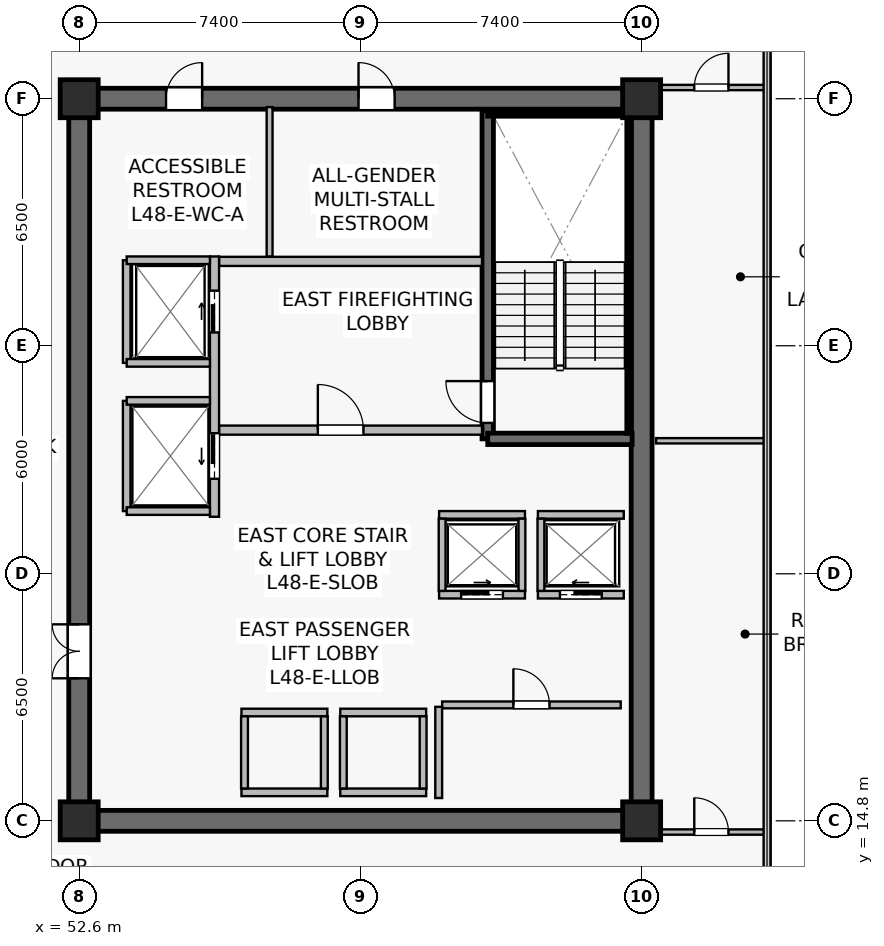
"""IFC4 building model, lengths in metres.
Left out: names, types, materials, properties, quantities, classifications, styles, units other than length and angle.
Written with IfcOpenShell. Run it as: python <this file> out.ifc"""

import sys

from ifc_helpers import new_model, si_unit, direction, frame, frame_2d, origin, origin_2d, place, context, subcontext, project, spatial, rectangle, extrude, source, transform, mapped, element, fill, save


model = new_model("IFC4")
c1 = context("Model", 3, precision=1e-05, world=origin(), true_north=direction((0.0, 1.0)))
c2 = subcontext(c1, "Body", "Model", "MODEL_VIEW")
j1 = project(units=[si_unit("LENGTHUNIT", "METRE"), si_unit("PLANEANGLEUNIT", "RADIAN")], contexts=[c1])
p1 = place(None, origin())
s1 = spatial("IfcSite", under=j1, at=p1, CompositionType="ELEMENT")
p2 = place(p1, origin())
s2 = spatial("IfcBuilding", under=s1, at=p2, CompositionType="ELEMENT")
p3 = place(p2, frame((0.0, 0.0, 201.4)))
s3 = spatial("IfcBuildingStorey", under=s2, at=p3, CompositionType="ELEMENT", Elevation=201.4)
p4 = place(p3, frame((52.325, 14.8, 0.0), z_axis=(0.0, 0.0, 1.0), x_axis=(1.0, 0.0, 0.0)))
e1 = element("IfcWall", 1, at=p4, inside=s3, PredefinedType="SHEAR", context=c2, shape_type="SweptSolid", body=[
    extrude(rectangle(XDim=15.35, YDim=0.55, at=frame_2d((7.675, 0.0))), origin(), (0.0, 0.0, 1.0), 3.8),
])
p5 = place(p3, frame((52.325, 33.8, 0.0), z_axis=(0.0, 0.0, 1.0), x_axis=(1.0, 0.0, 0.0)))
e2 = element("IfcWall", 2, at=p5, inside=s3, PredefinedType="SHEAR", context=c2, shape_type="SweptSolid", body=[
    extrude(rectangle(XDim=15.35, YDim=0.55, at=frame_2d((7.675, 0.0))), origin(), (0.0, 0.0, 1.0), 3.8),
])
p6 = place(p5, frame((7.625, 0.0, 0.0)))
e3 = element("IfcOpeningElement", 3, at=p6, cuts=e2, PredefinedType="OPENING", context=c2, shape_type="SweptSolid", body=[
    extrude(rectangle(XDim=0.95, YDim=2.15, at=frame_2d((0.475, 1.075))), frame((0.0, 0.285, 0.0), z_axis=(0.0, -1.0, 0.0), x_axis=(1.0, 0.0, 0.0)), (0.0, 0.0, 1.0), 0.57),
])
p7 = place(p5, frame((2.56, 0.0, 0.0)))
e4 = element("IfcOpeningElement", 4, at=p7, cuts=e2, PredefinedType="OPENING", context=c2, shape_type="SweptSolid", body=[
    extrude(rectangle(XDim=0.95, YDim=2.15, at=frame_2d((0.475, 1.075))), frame((0.0, 0.285, 0.0), z_axis=(0.0, -1.0, 0.0), x_axis=(1.0, 0.0, 0.0)), (0.0, 0.0, 1.0), 0.57),
])
p8 = place(p3, frame((52.6, 15.075, 0.0), z_axis=(0.0, 0.0, 1.0), x_axis=(0.0, 1.0, 0.0)))
e5 = element("IfcWall", 5, at=p8, inside=s3, PredefinedType="SHEAR", context=c2, shape_type="SweptSolid", body=[
    extrude(rectangle(XDim=18.45, YDim=0.55, at=frame_2d((9.225, 0.0))), origin(), (0.0, 0.0, 1.0), 3.8),
])
p9 = place(p8, frame((3.475, 0.0, 0.0)))
e6 = element("IfcOpeningElement", 6, at=p9, cuts=e5, PredefinedType="OPENING", context=c2, shape_type="SweptSolid", body=[
    extrude(rectangle(XDim=1.42, YDim=2.2, at=frame_2d((0.71, 1.1))), frame((0.0, 0.285, 0.0), z_axis=(0.0, -1.0, 0.0), x_axis=(1.0, 0.0, 0.0)), (0.0, 0.0, 1.0), 0.57),
])
p10 = place(p3, frame((67.4, 15.075, 0.0), z_axis=(0.0, 0.0, 1.0), x_axis=(0.0, 1.0, 0.0)))
e7 = element("IfcWall", 7, at=p10, inside=s3, PredefinedType="SHEAR", context=c2, shape_type="SweptSolid", body=[
    extrude(rectangle(XDim=18.45, YDim=0.55, at=frame_2d((9.225, 0.0))), origin(), (0.0, 0.0, 1.0), 3.8),
])
p11 = place(p3, frame((63.35, 24.85, 0.0), z_axis=(0.0, 0.0, 1.0), x_axis=(0.0, 1.0, 0.0)))
e8 = element("IfcWall", 8, at=p11, inside=s3, PredefinedType="SHEAR", context=c2, shape_type="SweptSolid", body=[
    extrude(rectangle(XDim=8.63, YDim=0.3, at=frame_2d((4.315, 0.0))), origin(), (0.0, 0.0, 1.0), 3.8),
])
p12 = place(p11, frame((0.42, 0.0, 0.0)))
e9 = element("IfcOpeningElement", 9, at=p12, cuts=e8, PredefinedType="OPENING", context=c2, shape_type="SweptSolid", body=[
    extrude(rectangle(XDim=1.1, YDim=2.15, at=frame_2d((0.55, 1.075))), frame((0.0, 0.16, 0.0), z_axis=(0.0, -1.0, 0.0), x_axis=(1.0, 0.0, 0.0)), (0.0, 0.0, 1.0), 0.32),
])
p13 = place(p3, frame((63.35, 24.85, 0.0), z_axis=(0.0, 0.0, 1.0), x_axis=(1.0, 0.0, 0.0)))
e10 = element("IfcWall", 10, at=p13, inside=s3, PredefinedType="SHEAR", context=c2, shape_type="SweptSolid", body=[
    extrude(rectangle(XDim=3.8, YDim=0.3, at=frame_2d((1.9, 0.0))), origin(), (0.0, 0.0, 1.0), 3.8),
])
p14 = place(p3, frame((63.35, 33.4, 0.0), z_axis=(0.0, 0.0, 1.0), x_axis=(1.0, 0.0, 0.0)))
e11 = element("IfcWall", 11, at=p14, inside=s3, PredefinedType="SOLIDWALL", context=c2, shape_type="SweptSolid", body=[
    extrude(rectangle(XDim=3.72, YDim=0.12, at=frame_2d((1.86, 0.0))), origin(), (0.0, 0.0, 1.0), 3.8),
])
p15 = place(p3, frame((67.07, 25.0, 0.0), z_axis=(0.0, 0.0, 1.0), x_axis=(0.0, 1.0, 0.0)))
e12 = element("IfcWall", 12, at=p15, inside=s3, PredefinedType="SOLIDWALL", context=c2, shape_type="SweptSolid", body=[
    extrude(rectangle(XDim=8.32, YDim=0.12, at=frame_2d((4.16, 0.0))), origin(), (0.0, 0.0, 1.0), 3.8),
])
m1 = source(origin(), c2, "Body", "SweptSolid", [
    extrude(rectangle(XDim=1.0, YDim=1.0, at=origin_2d()), origin(), (0.0, 0.0, 1.0), 4.1),
])
for number, where, z_axis, x_axis in (
    (13, (52.6, 14.8, 0.0), (0.0, 0.0, 1.0), (1.0, 0.0, 0.0)),
    (14, (67.4, 14.8, 0.0), (0.0, 0.0, 1.0), (1.0, 0.0, 0.0)),
    (15, (52.6, 33.8, 0.0), (0.0, 0.0, 1.0), (1.0, 0.0, 0.0)),
    (16, (67.4, 33.8, 0.0), (0.0, 0.0, 1.0), (1.0, 0.0, 0.0)),
):
    element("IfcColumn", number, at=place(p3, frame(where, z_axis=z_axis, x_axis=x_axis)), inside=s3, PredefinedType="COLUMN", context=c2, shape_type="MappedRepresentation", body=[
        mapped(m1, transform((0.0, 0.0, 0.0), scale=1.0)),
    ])
p16 = place(p3, frame((56.28, 25.08, 0.0), z_axis=(0.0, 0.0, 1.0), x_axis=(1.0, 0.0, 0.0)))
e17 = element("IfcWall", 17, at=p16, inside=s3, PredefinedType="SOLIDWALL", context=c2, shape_type="SweptSolid", body=[
    extrude(rectangle(XDim=6.92, YDim=0.24, at=frame_2d((3.46, 0.0))), origin(), (0.0, 0.0, 1.0), 3.197),
])
p17 = place(p16, frame((2.6, 0.0, 0.0)))
e18 = element("IfcOpeningElement", 18, at=p17, cuts=e17, PredefinedType="OPENING", context=c2, shape_type="SweptSolid", body=[
    extrude(rectangle(XDim=1.2, YDim=2.16, at=frame_2d((0.6, 1.08))), frame((0.0, 0.13, 0.0), z_axis=(0.0, -1.0, 0.0), x_axis=(1.0, 0.0, 0.0)), (0.0, 0.0, 1.0), 0.26),
])
p18 = place(p3, frame((56.28, 29.52, 0.0), z_axis=(0.0, 0.0, 1.0), x_axis=(1.0, 0.0, 0.0)))
e19 = element("IfcWall", 19, at=p18, inside=s3, PredefinedType="SOLIDWALL", context=c2, shape_type="SweptSolid", body=[
    extrude(rectangle(XDim=6.92, YDim=0.24, at=frame_2d((3.46, 0.0))), origin(), (0.0, 0.0, 1.0), 3.197),
])
p19 = place(p3, frame((56.16, 22.8, 0.0), z_axis=(0.0, 0.0, 1.0), x_axis=(0.0, 1.0, 0.0)))
e20 = element("IfcWall", 20, at=p19, inside=s3, PredefinedType="SOLIDWALL", context=c2, shape_type="SweptSolid", body=[
    extrude(rectangle(XDim=6.85, YDim=0.24, at=frame_2d((3.425, 0.0))), origin(), (0.0, 0.0, 1.0), 2.935),
])
p20 = place(p19, frame((4.85, 0.0, 0.0)))
e21 = element("IfcOpeningElement", 21, at=p20, cuts=e20, PredefinedType="OPENING", context=c2, shape_type="SweptSolid", body=[
    extrude(rectangle(XDim=1.1, YDim=2.22, at=frame_2d((0.55, 1.11))), frame((0.0, 0.13, 0.0), z_axis=(0.0, -1.0, 0.0), x_axis=(1.0, 0.0, 0.0)), (0.0, 0.0, 1.0), 0.26),
])
p21 = place(p19, frame((1.0, 0.0, 0.0)))
e22 = element("IfcOpeningElement", 22, at=p21, cuts=e20, PredefinedType="OPENING", context=c2, shape_type="SweptSolid", body=[
    extrude(rectangle(XDim=1.2, YDim=2.22, at=frame_2d((0.6, 1.11))), frame((0.0, 0.13, 0.0), z_axis=(0.0, -1.0, 0.0), x_axis=(1.0, 0.0, 0.0)), (0.0, 0.0, 1.0), 0.26),
])
for number, where, z_axis, x_axis in (
    (23, (59.47, 17.65, 0.0), (0.0, 0.0, 1.0), (1.0, 0.0, 0.0)),
    (24, (59.47, 15.55, 0.0), (0.0, 0.0, 1.0), (1.0, 0.0, 0.0)),
):
    element("IfcWall", number, at=place(p3, frame(where, z_axis=z_axis, x_axis=x_axis)), inside=s3, PredefinedType="SOLIDWALL", context=c2, shape_type="SweptSolid", body=[
        extrude(rectangle(XDim=2.26, YDim=0.2, at=frame_2d((1.13, 0.0))), origin(), (0.0, 0.0, 1.0), 3.197),
    ])
for number, where, z_axis, x_axis in (
    (25, (59.55, 15.65, 0.0), (0.0, 0.0, 1.0), (0.0, 1.0, 0.0)),
    (26, (61.65, 15.65, 0.0), (0.0, 0.0, 1.0), (0.0, 1.0, 0.0)),
):
    element("IfcWall", number, at=place(p3, frame(where, z_axis=z_axis, x_axis=x_axis)), inside=s3, PredefinedType="SOLIDWALL", context=c2, shape_type="SweptSolid", body=[
        extrude(rectangle(XDim=1.9, YDim=0.18, at=frame_2d((0.95, 0.0))), origin(), (0.0, 0.0, 1.0), 3.8),
    ])
for number, where, z_axis, x_axis in (
    (27, (56.87, 17.65, 0.0), (0.0, 0.0, 1.0), (1.0, 0.0, 0.0)),
    (28, (56.87, 15.55, 0.0), (0.0, 0.0, 1.0), (1.0, 0.0, 0.0)),
):
    element("IfcWall", number, at=place(p3, frame(where, z_axis=z_axis, x_axis=x_axis)), inside=s3, PredefinedType="SOLIDWALL", context=c2, shape_type="SweptSolid", body=[
        extrude(rectangle(XDim=2.26, YDim=0.2, at=frame_2d((1.13, 0.0))), origin(), (0.0, 0.0, 1.0), 3.8),
    ])
for number, where, z_axis, x_axis in (
    (29, (56.95, 15.65, 0.0), (0.0, 0.0, 1.0), (0.0, 1.0, 0.0)),
    (30, (59.05, 15.65, 0.0), (0.0, 0.0, 1.0), (0.0, 1.0, 0.0)),
):
    element("IfcWall", number, at=place(p3, frame(where, z_axis=z_axis, x_axis=x_axis)), inside=s3, PredefinedType="SOLIDWALL", context=c2, shape_type="SweptSolid", body=[
        extrude(rectangle(XDim=1.9, YDim=0.18, at=frame_2d((0.95, 0.0))), origin(), (0.0, 0.0, 1.0), 3.8),
    ])
p22 = place(p3, frame((64.67, 20.75, 0.0), z_axis=(0.0, 0.0, 1.0), x_axis=(1.0, 0.0, 0.0)))
e31 = element("IfcWall", 31, at=p22, inside=s3, PredefinedType="SOLIDWALL", context=c2, shape_type="SweptSolid", body=[
    extrude(rectangle(XDim=2.26, YDim=0.2, at=frame_2d((1.13, 0.0))), origin(), (0.0, 0.0, 1.0), 3.8),
])
p23 = place(p22, frame((0.58, 0.0, 0.0)))
e32 = element("IfcOpeningElement", 32, at=p23, cuts=e31, PredefinedType="OPENING", context=c2, shape_type="SweptSolid", body=[
    extrude(rectangle(XDim=1.1, YDim=2.22, at=frame_2d((0.55, 1.11))), frame((0.0, 0.11, 0.0), z_axis=(0.0, -1.0, 0.0), x_axis=(1.0, 0.0, 0.0)), (0.0, 0.0, 1.0), 0.22),
])
p24 = place(p3, frame((64.67, 22.85, 0.0), z_axis=(0.0, 0.0, 1.0), x_axis=(1.0, 0.0, 0.0)))
e33 = element("IfcWall", 33, at=p24, inside=s3, PredefinedType="SOLIDWALL", context=c2, shape_type="SweptSolid", body=[
    extrude(rectangle(XDim=2.26, YDim=0.2, at=frame_2d((1.13, 0.0))), origin(), (0.0, 0.0, 1.0), 3.8),
])
p25 = place(p3, frame((64.75, 20.85, 0.0), z_axis=(0.0, 0.0, 1.0), x_axis=(0.0, 1.0, 0.0)))
e34 = element("IfcWall", 34, at=p25, inside=s3, PredefinedType="SOLIDWALL", context=c2, shape_type="SweptSolid", body=[
    extrude(rectangle(XDim=1.9, YDim=0.18, at=frame_2d((0.95, 0.0))), origin(), (0.0, 0.0, 1.0), 3.8),
])
p26 = place(p3, frame((62.07, 20.75, 0.0), z_axis=(0.0, 0.0, 1.0), x_axis=(1.0, 0.0, 0.0)))
e35 = element("IfcWall", 35, at=p26, inside=s3, PredefinedType="SOLIDWALL", context=c2, shape_type="SweptSolid", body=[
    extrude(rectangle(XDim=2.26, YDim=0.2, at=frame_2d((1.13, 0.0))), origin(), (0.0, 0.0, 1.0), 3.8),
])
p27 = place(p26, frame((0.58, 0.0, 0.0)))
e36 = element("IfcOpeningElement", 36, at=p27, cuts=e35, PredefinedType="OPENING", context=c2, shape_type="SweptSolid", body=[
    extrude(rectangle(XDim=1.1, YDim=2.22, at=frame_2d((0.55, 1.11))), frame((0.0, 0.11, 0.0), z_axis=(0.0, -1.0, 0.0), x_axis=(1.0, 0.0, 0.0)), (0.0, 0.0, 1.0), 0.22),
])
p28 = place(p3, frame((62.07, 22.85, 0.0), z_axis=(0.0, 0.0, 1.0), x_axis=(1.0, 0.0, 0.0)))
e37 = element("IfcWall", 37, at=p28, inside=s3, PredefinedType="SOLIDWALL", context=c2, shape_type="SweptSolid", body=[
    extrude(rectangle(XDim=2.26, YDim=0.2, at=frame_2d((1.13, 0.0))), origin(), (0.0, 0.0, 1.0), 3.8),
])
for number, where, z_axis, x_axis in (
    (38, (62.15, 20.85, 0.0), (0.0, 0.0, 1.0), (0.0, 1.0, 0.0)),
    (39, (64.25, 20.85, 0.0), (0.0, 0.0, 1.0), (0.0, 1.0, 0.0)),
):
    element("IfcWall", number, at=place(p3, frame(where, z_axis=z_axis, x_axis=x_axis)), inside=s3, PredefinedType="SOLIDWALL", context=c2, shape_type="SweptSolid", body=[
        extrude(rectangle(XDim=1.9, YDim=0.18, at=frame_2d((0.95, 0.0))), origin(), (0.0, 0.0, 1.0), 3.8),
    ])
p29 = place(p3, frame((53.85, 26.85, 0.0), z_axis=(0.0, 0.0, 1.0), x_axis=(0.0, 1.0, 0.0)))
e40 = element("IfcWall", 40, at=p29, inside=s3, PredefinedType="SOLIDWALL", context=c2, shape_type="SweptSolid", body=[
    extrude(rectangle(XDim=2.7, YDim=0.2, at=frame_2d((1.35, 0.0))), origin(), (0.0, 0.0, 1.0), 3.8),
])
p30 = place(p3, frame((53.85, 29.55, 0.0), z_axis=(0.0, 0.0, 1.0), x_axis=(1.0, 0.0, 0.0)))
e41 = element("IfcWall", 41, at=p30, inside=s3, PredefinedType="SOLIDWALL", context=c2, shape_type="SweptSolid", body=[
    extrude(rectangle(XDim=2.19, YDim=0.2, at=frame_2d((1.095, 0.0))), origin(), (0.0, 0.0, 1.0), 3.8),
])
p31 = place(p3, frame((53.85, 26.85, 0.0), z_axis=(0.0, 0.0, 1.0), x_axis=(1.0, 0.0, 0.0)))
e42 = element("IfcWall", 42, at=p31, inside=s3, PredefinedType="SOLIDWALL", context=c2, shape_type="SweptSolid", body=[
    extrude(rectangle(XDim=2.19, YDim=0.2, at=frame_2d((1.095, 0.0))), origin(), (0.0, 0.0, 1.0), 3.197),
])
p32 = place(p3, frame((53.85, 22.95, 0.0), z_axis=(0.0, 0.0, 1.0), x_axis=(0.0, 1.0, 0.0)))
e43 = element("IfcWall", 43, at=p32, inside=s3, PredefinedType="SOLIDWALL", context=c2, shape_type="SweptSolid", body=[
    extrude(rectangle(XDim=2.9, YDim=0.2, at=frame_2d((1.45, 0.0))), origin(), (0.0, 0.0, 1.0), 2.935),
])
for number, where, z_axis, x_axis in (
    (44, (53.85, 25.85, 0.0), (0.0, 0.0, 1.0), (1.0, 0.0, 0.0)),
    (45, (53.85, 22.95, 0.0), (0.0, 0.0, 1.0), (1.0, 0.0, 0.0)),
):
    element("IfcWall", number, at=place(p3, frame(where, z_axis=z_axis, x_axis=x_axis)), inside=s3, PredefinedType="SOLIDWALL", context=c2, shape_type="SweptSolid", body=[
        extrude(rectangle(XDim=2.19, YDim=0.2, at=frame_2d((1.095, 0.0))), origin(), (0.0, 0.0, 1.0), 3.8),
    ])
p33 = place(p3, frame((62.15, 17.85, 0.0), z_axis=(0.0, 0.0, 1.0), x_axis=(1.0, 0.0, 0.0)))
e46 = element("IfcWall", 46, at=p33, inside=s3, PredefinedType="SOLIDWALL", context=c2, shape_type="SweptSolid", body=[
    extrude(rectangle(XDim=4.7, YDim=0.18, at=frame_2d((2.35, 0.0))), origin(), (0.0, 0.0, 1.0), 3.8),
])
p34 = place(p33, frame((1.875, 0.0, 0.0)))
e47 = element("IfcOpeningElement", 47, at=p34, cuts=e46, PredefinedType="OPENING", context=c2, shape_type="SweptSolid", body=[
    extrude(rectangle(XDim=0.95, YDim=2.15, at=frame_2d((0.475, 1.075))), frame((0.0, 0.1, 0.0), z_axis=(0.0, -1.0, 0.0), x_axis=(1.0, 0.0, 0.0)), (0.0, 0.0, 1.0), 0.2),
])
p35 = place(p3, frame((62.06, 15.4, 0.0), z_axis=(0.0, 0.0, 1.0), x_axis=(0.0, 1.0, 0.0)))
e48 = element("IfcWall", 48, at=p35, inside=s3, PredefinedType="SOLIDWALL", context=c2, shape_type="SweptSolid", body=[
    extrude(rectangle(XDim=2.4, YDim=0.18, at=frame_2d((1.2, 0.0))), origin(), (0.0, 0.0, 1.0), 3.8),
])
p36 = place(p3, frame((57.61, 29.65, 0.0), z_axis=(0.0, 0.0, 1.0), x_axis=(0.0, 1.0, 0.0)))
e49 = element("IfcWall", 49, at=p36, inside=s3, PredefinedType="PLUMBINGWALL", context=c2, shape_type="SweptSolid", body=[
    extrude(rectangle(XDim=3.93, YDim=0.155, at=frame_2d((1.965, 0.0))), origin(), (0.0, 0.0, 1.0), 3.8),
])
p37 = place(p3, frame((67.78, 24.8, 0.0), z_axis=(0.0, 0.0, 1.0), x_axis=(1.0, 0.0, 0.0)))
e50 = element("IfcWall", 50, at=p37, inside=s3, PredefinedType="PARTITIONING", context=c2, shape_type="SweptSolid", body=[
    extrude(rectangle(XDim=2.91, YDim=0.14, at=frame_2d((1.455, 0.0))), origin(), (0.0, 0.0, 1.0), 3.8),
])
p38 = place(p3, frame((67.78, 14.505, 0.0), z_axis=(0.0, 0.0, 1.0), x_axis=(1.0, 0.0, 0.0)))
e51 = element("IfcWall", 51, at=p38, inside=s3, PredefinedType="PARTITIONING", context=c2, shape_type="SweptSolid", body=[
    extrude(rectangle(XDim=2.91, YDim=0.14, at=frame_2d((1.455, 0.0))), origin(), (0.0, 0.0, 1.0), 3.8),
])
p39 = place(p38, frame((1.005, 0.0, 0.0)))
e52 = element("IfcOpeningElement", 52, at=p39, cuts=e51, PredefinedType="OPENING", context=c2, shape_type="SweptSolid", body=[
    extrude(rectangle(XDim=0.9, YDim=2.1, at=frame_2d((0.45, 1.05))), frame((0.0, 0.08, 0.0), z_axis=(0.0, -1.0, 0.0), x_axis=(1.0, 0.0, 0.0)), (0.0, 0.0, 1.0), 0.16),
])
p40 = place(p3, frame((67.78, 34.095, 0.0), z_axis=(0.0, 0.0, 1.0), x_axis=(1.0, 0.0, 0.0)))
e53 = element("IfcWall", 53, at=p40, inside=s3, PredefinedType="PARTITIONING", context=c2, shape_type="SweptSolid", body=[
    extrude(rectangle(XDim=2.91, YDim=0.14, at=frame_2d((1.455, 0.0))), origin(), (0.0, 0.0, 1.0), 3.8),
])
p41 = place(p40, frame((1.005, 0.0, 0.0)))
e54 = element("IfcOpeningElement", 54, at=p41, cuts=e53, PredefinedType="OPENING", context=c2, shape_type="SweptSolid", body=[
    extrude(rectangle(XDim=0.9, YDim=2.1, at=frame_2d((0.45, 1.05))), frame((0.0, 0.08, 0.0), z_axis=(0.0, -1.0, 0.0), x_axis=(1.0, 0.0, 0.0)), (0.0, 0.0, 1.0), 0.16),
])
m2 = source(origin(), c2, "Body", "SweptSolid", [
    extrude(rectangle(XDim=1.1, YDim=2.15, at=frame_2d((0.55, 1.075))), frame((0.0, 0.025, 0.0), z_axis=(0.0, -1.0, 0.0), x_axis=(1.0, 0.0, 0.0)), (0.0, 0.0, 1.0), 0.05),
])
p42 = place(p12, origin())
e55 = element("IfcDoor", 55, at=p42, inside=s3, OperationType="SINGLE_SWING_RIGHT", PredefinedType="DOOR", context=c2, shape_type="MappedRepresentation", body=[
    mapped(m2, transform((0.0, 0.0, 0.0), scale=1.0)),
])
fill(e9, e55)
m3 = source(origin(), c2, "Body", "SweptSolid", [
    extrude(rectangle(XDim=1.2, YDim=2.16, at=frame_2d((0.6, 1.08))), frame((0.0, 0.025, 0.0), z_axis=(0.0, -1.0, 0.0), x_axis=(1.0, 0.0, 0.0)), (0.0, 0.0, 1.0), 0.05),
])
p43 = place(p17, origin())
e56 = element("IfcDoor", 56, at=p43, inside=s3, OperationType="SINGLE_SWING_LEFT", PredefinedType="DOOR", context=c2, shape_type="MappedRepresentation", body=[
    mapped(m3, transform((0.0, 0.0, 0.0), scale=1.0)),
])
fill(e18, e56)
m4 = source(origin(), c2, "Body", "SweptSolid", [
    extrude(rectangle(XDim=1.1, YDim=2.22, at=frame_2d((0.55, 1.11))), frame((0.0, 0.025, 0.0), z_axis=(0.0, -1.0, 0.0), x_axis=(1.0, 0.0, 0.0)), (0.0, 0.0, 1.0), 0.05),
])
p44 = place(p23, origin())
e57 = element("IfcDoor", 57, at=p44, inside=s3, OperationType="SLIDING_TO_LEFT", PredefinedType="USERDEFINED", context=c2, shape_type="MappedRepresentation", body=[
    mapped(m4, transform((0.0, 0.0, 0.0), scale=1.0)),
])
fill(e32, e57)
p45 = place(p27, origin())
e58 = element("IfcDoor", 58, at=p45, inside=s3, OperationType="SLIDING_TO_RIGHT", PredefinedType="USERDEFINED", context=c2, shape_type="MappedRepresentation", body=[
    mapped(m4, transform((0.0, 0.0, 0.0), scale=1.0)),
])
fill(e36, e58)
p46 = place(p20, origin())
e59 = element("IfcDoor", 59, at=p46, inside=s3, OperationType="SLIDING_TO_RIGHT", PredefinedType="USERDEFINED", context=c2, shape_type="MappedRepresentation", body=[
    mapped(m4, transform((0.0, 0.0, 0.0), scale=1.0)),
])
fill(e21, e59)
m5 = source(origin(), c2, "Body", "SweptSolid", [
    extrude(rectangle(XDim=1.2, YDim=2.22, at=frame_2d((0.6, 1.11))), frame((0.0, 0.025, 0.0), z_axis=(0.0, -1.0, 0.0), x_axis=(1.0, 0.0, 0.0)), (0.0, 0.0, 1.0), 0.05),
])
p47 = place(p21, origin())
e60 = element("IfcDoor", 60, at=p47, inside=s3, OperationType="SLIDING_TO_LEFT", PredefinedType="USERDEFINED", context=c2, shape_type="MappedRepresentation", body=[
    mapped(m5, transform((0.0, 0.0, 0.0), scale=1.0)),
])
fill(e22, e60)
m6 = source(origin(), c2, "Body", "SweptSolid", [
    extrude(rectangle(XDim=0.95, YDim=2.15, at=frame_2d((0.475, 1.075))), frame((0.0, 0.025, 0.0), z_axis=(0.0, -1.0, 0.0), x_axis=(1.0, 0.0, 0.0)), (0.0, 0.0, 1.0), 0.05),
])
p48 = place(p34, origin())
e61 = element("IfcDoor", 61, at=p48, inside=s3, OperationType="SINGLE_SWING_LEFT", PredefinedType="DOOR", context=c2, shape_type="MappedRepresentation", body=[
    mapped(m6, transform((0.0, 0.0, 0.0), scale=1.0)),
])
fill(e47, e61)
m7 = source(origin(), c2, "Body", "SweptSolid", [
    extrude(rectangle(XDim=1.42, YDim=2.2, at=frame_2d((0.71, 1.1))), frame((0.0, 0.025, 0.0), z_axis=(0.0, -1.0, 0.0), x_axis=(1.0, 0.0, 0.0)), (0.0, 0.0, 1.0), 0.05),
])
p49 = place(p9, origin())
e62 = element("IfcDoor", 62, at=p49, inside=s3, OperationType="DOUBLE_DOOR_SINGLE_SWING", PredefinedType="DOOR", context=c2, shape_type="MappedRepresentation", body=[
    mapped(m7, transform((0.0, 0.0, 0.0), scale=1.0)),
])
fill(e6, e62)
p50 = place(p6, origin())
e63 = element("IfcDoor", 63, at=p50, inside=s3, OperationType="SINGLE_SWING_LEFT", PredefinedType="DOOR", context=c2, shape_type="MappedRepresentation", body=[
    mapped(m6, transform((0.0, 0.0, 0.0), scale=1.0)),
])
fill(e3, e63)
p51 = place(p7, origin())
e64 = element("IfcDoor", 64, at=p51, inside=s3, OperationType="SINGLE_SWING_RIGHT", PredefinedType="DOOR", context=c2, shape_type="MappedRepresentation", body=[
    mapped(m6, transform((0.0, 0.0, 0.0), scale=1.0)),
])
fill(e4, e64)
m8 = source(origin(), c2, "Body", "SweptSolid", [
    extrude(rectangle(XDim=0.9, YDim=2.1, at=frame_2d((0.45, 1.05))), frame((0.0, 0.025, 0.0), z_axis=(0.0, -1.0, 0.0), x_axis=(1.0, 0.0, 0.0)), (0.0, 0.0, 1.0), 0.05),
])
p52 = place(p39, origin())
e65 = element("IfcDoor", 65, at=p52, inside=s3, OperationType="SINGLE_SWING_LEFT", PredefinedType="DOOR", context=c2, shape_type="MappedRepresentation", body=[
    mapped(m8, transform((0.0, 0.0, 0.0), scale=1.0)),
])
fill(e52, e65)
p53 = place(p41, origin())
e66 = element("IfcDoor", 66, at=p53, inside=s3, OperationType="SINGLE_SWING_RIGHT", PredefinedType="DOOR", context=c2, shape_type="MappedRepresentation", body=[
    mapped(m8, transform((0.0, 0.0, 0.0), scale=1.0)),
])
fill(e54, e66)
save(model, sys.argv[1])
